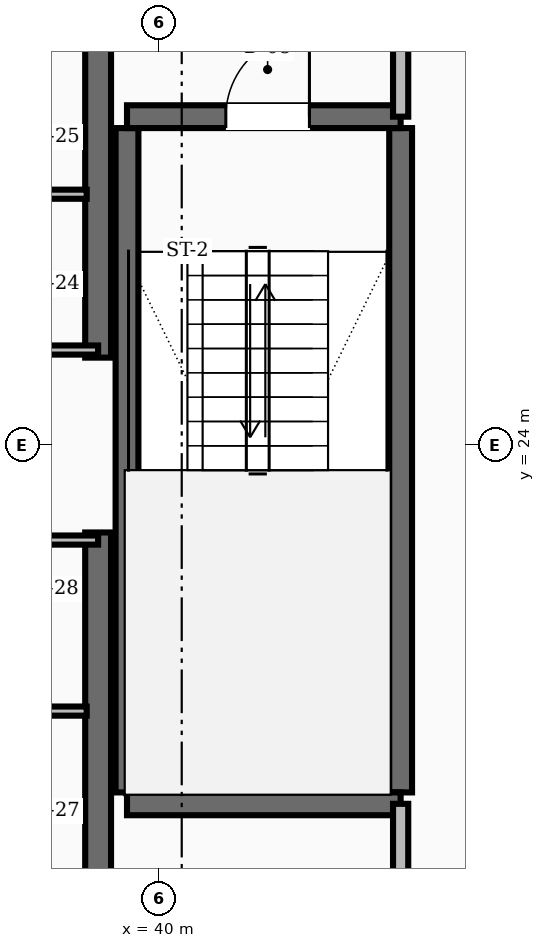
"""IFC4 building model, lengths in metres.
Left out: names, types, materials, properties, quantities, classifications, styles, units other than length and angle.
Written with IfcOpenShell. Run it as: python <this file> out.ifc"""

import sys

from ifc_helpers import new_model, si_unit, direction, frame, frame_2d, origin, place, context, subcontext, project, spatial, rectangle, extrude, element, fill, save


model = new_model("IFC4")
c1 = context("Model", 3, precision=1e-05, world=origin(), true_north=direction((0.0, 1.0)))
c2 = subcontext(c1, "Body", "Model", "MODEL_VIEW")
j1 = project(units=[si_unit("LENGTHUNIT", "METRE"), si_unit("PLANEANGLEUNIT", "RADIAN")], contexts=[c1])
p1 = place(None, origin())
s1 = spatial("IfcSite", under=j1, at=p1, CompositionType="ELEMENT")
p2 = place(p1, origin())
s2 = spatial("IfcBuilding", under=s1, at=p2, CompositionType="ELEMENT")
p3 = place(p2, frame((0.0, 0.0, 171.2)))
s3 = spatial("IfcBuildingStorey", under=s2, at=p3, CompositionType="ELEMENT", Elevation=171.2)
for number, where, z_axis, x_axis in (
    (1, (39.2, 16.55, 0.0), (0.0, 0.0, 1.0), (0.0, 1.0, 0.0)),
    (2, (39.2, 25.15, 0.0), (0.0, 0.0, 1.0), (0.0, 1.0, 0.0)),
):
    element("IfcWall", number, at=place(p3, frame(where, z_axis=z_axis, x_axis=x_axis)), inside=s3, PredefinedType="SHEAR", context=c2, shape_type="SweptSolid", body=[
        extrude(rectangle(XDim=6.3, YDim=0.34, at=frame_2d((3.15, 0.0))), origin(), (0.0, 0.0, 1.0), 3.6),
    ])
for number, where, z_axis, x_axis in (
    (3, (43.18, 19.43, 0.0), (0.0, 0.0, 1.0), (0.0, 1.0, 0.0)),
    (4, (39.58, 19.43, 0.0), (0.0, 0.0, 1.0), (0.0, 1.0, 0.0)),
):
    element("IfcWall", number, at=place(p3, frame(where, z_axis=z_axis, x_axis=x_axis)), inside=s3, PredefinedType="SHEAR", context=c2, shape_type="SweptSolid", body=[
        extrude(rectangle(XDim=8.74, YDim=0.3, at=frame_2d((4.37, 0.0))), origin(), (0.0, 0.0, 1.0), 3.6),
    ])
p4 = place(p3, frame((39.58, 19.28, 0.0), z_axis=(0.0, 0.0, 1.0), x_axis=(1.0, 0.0, 0.0)))
e5 = element("IfcWall", 5, at=p4, inside=s3, PredefinedType="SHEAR", context=c2, shape_type="SweptSolid", body=[
    extrude(rectangle(XDim=3.6, YDim=0.3, at=frame_2d((1.8, 0.0))), origin(), (0.0, 0.0, 1.0), 3.6),
])
p5 = place(p3, frame((39.58, 28.32, 0.0), z_axis=(0.0, 0.0, 1.0), x_axis=(1.0, 0.0, 0.0)))
e6 = element("IfcWall", 6, at=p5, inside=s3, PredefinedType="SHEAR", context=c2, shape_type="SweptSolid", body=[
    extrude(rectangle(XDim=3.6, YDim=0.3, at=frame_2d((1.8, 0.0))), origin(), (0.0, 0.0, 1.0), 3.6),
])
p6 = place(p5, frame((1.3, 0.0, 0.0)))
e7 = element("IfcOpeningElement", 7, at=p6, cuts=e6, PredefinedType="OPENING", context=c2, shape_type="SweptSolid", body=[
    extrude(rectangle(XDim=1.1, YDim=2.1, at=frame_2d((0.55, 1.05))), frame((0.0, 0.16, 0.0), z_axis=(0.0, -1.0, 0.0), x_axis=(1.0, 0.0, 0.0)), (0.0, 0.0, 1.0), 0.32),
])
p7 = place(p3, frame((43.18, 28.32, 0.0), z_axis=(0.0, 0.0, 1.0), x_axis=(0.0, 1.0, 0.0)))
e8 = element("IfcWall", 8, at=p7, inside=s3, PredefinedType="SOLIDWALL", context=c2, shape_type="SweptSolid", body=[
    extrude(rectangle(XDim=3.13, YDim=0.2, at=frame_2d((1.565, 0.0))), origin(), (0.0, 0.0, 1.0), 2.8),
])
p8 = place(p7, frame((1.015, 0.0, 0.0)))
e9 = element("IfcOpeningElement", 9, at=p8, cuts=e8, PredefinedType="OPENING", context=c2, shape_type="SweptSolid", body=[
    extrude(rectangle(XDim=1.1, YDim=2.1, at=frame_2d((0.55, 1.05))), frame((0.0, 0.11, 0.0), z_axis=(0.0, -1.0, 0.0), x_axis=(1.0, 0.0, 0.0)), (0.0, 0.0, 1.0), 0.22),
])
p9 = place(p3, frame((43.18, 16.55, 0.0), z_axis=(0.0, 0.0, 1.0), x_axis=(0.0, 1.0, 0.0)))
e10 = element("IfcWall", 10, at=p9, inside=s3, PredefinedType="SOLIDWALL", context=c2, shape_type="SweptSolid", body=[
    extrude(rectangle(XDim=2.73, YDim=0.2, at=frame_2d((1.365, 0.0))), origin(), (0.0, 0.0, 1.0), 2.8),
])
p10 = place(p9, frame((0.89, 0.0, 0.0)))
e11 = element("IfcOpeningElement", 11, at=p10, cuts=e10, PredefinedType="OPENING", context=c2, shape_type="SweptSolid", body=[
    extrude(rectangle(XDim=0.95, YDim=2.1, at=frame_2d((0.475, 1.05))), frame((0.0, 0.11, 0.0), z_axis=(0.0, -1.0, 0.0), x_axis=(1.0, 0.0, 0.0)), (0.0, 0.0, 1.0), 0.22),
])
for number, where, z_axis, x_axis in (
    (12, (37.4, 25.25, 0.0), (0.0, 0.0, 1.0), (1.0, 0.0, 0.0)),
    (13, (37.4, 22.75, 0.0), (0.0, 0.0, 1.0), (1.0, 0.0, 0.0)),
):
    element("IfcWall", number, at=place(p3, frame(where, z_axis=z_axis, x_axis=x_axis)), inside=s3, PredefinedType="PARTITIONING", context=c2, shape_type="SweptSolid", body=[
        extrude(rectangle(XDim=1.8, YDim=0.12, at=frame_2d((0.9, 0.0))), origin(), (0.0, 0.0, 1.0), 2.8),
    ])
for number, where, z_axis, x_axis in (
    (14, (37.4, 27.3, 0.0), (0.0, 0.0, 1.0), (1.0, 0.0, 0.0)),
    (15, (37.4, 20.5, 0.0), (0.0, 0.0, 1.0), (1.0, 0.0, 0.0)),
):
    element("IfcWall", number, at=place(p3, frame(where, z_axis=z_axis, x_axis=x_axis)), inside=s3, PredefinedType="PARTITIONING", context=c2, shape_type="SweptSolid", body=[
        extrude(rectangle(XDim=1.65, YDim=0.12, at=frame_2d((0.825, 0.0))), origin(), (0.0, 0.0, 1.0), 2.8),
    ])
p11 = place(p6, origin())
e16 = element("IfcDoor", 16, at=p11, inside=s3, OperationType="SINGLE_SWING_RIGHT", PredefinedType="DOOR", context=c2, shape_type="SweptSolid", body=[
    extrude(rectangle(XDim=1.1, YDim=2.1, at=frame_2d((0.55, 1.05))), frame((0.0, 0.025, 0.0), z_axis=(0.0, -1.0, 0.0), x_axis=(1.0, 0.0, 0.0)), (0.0, 0.0, 1.0), 0.05),
])
fill(e7, e16)
save(model, sys.argv[1])
